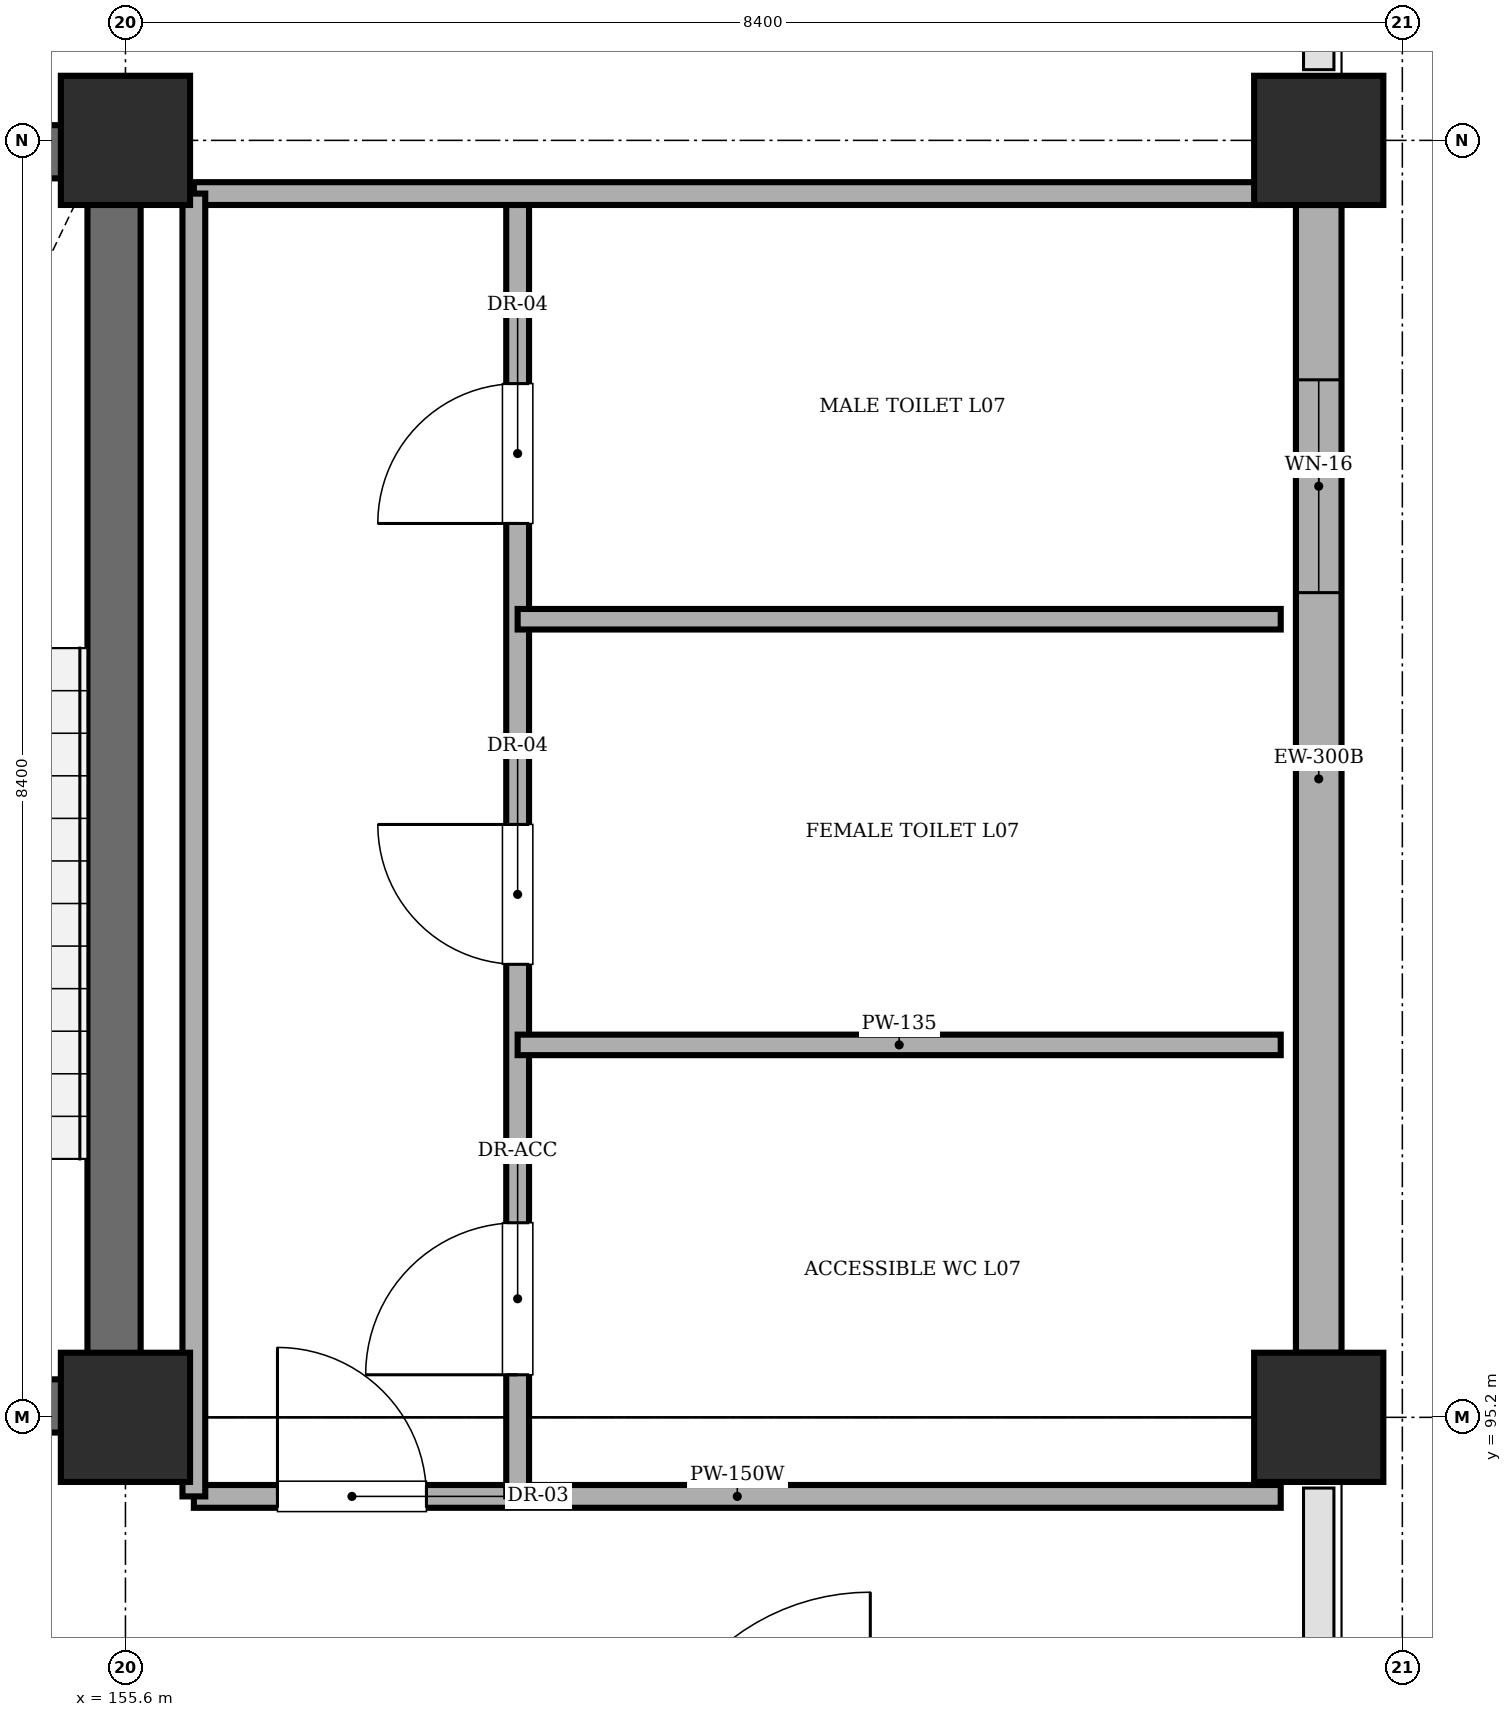
"""IFC4 building model, lengths in metres.
Left out: names, types, materials, properties, quantities, classifications, styles, units other than length and angle.
Written with IfcOpenShell. Run it as: python <this file> out.ifc"""

import sys

from ifc_helpers import new_model, si_unit, direction, frame, frame_2d, origin, origin_2d, place, context, subcontext, project, spatial, rectangle, extrude, element, fill, save


model = new_model("IFC4")
c1 = context("Model", 3, precision=1e-05, world=origin(), true_north=direction((0.0, 1.0)))
c2 = subcontext(c1, "Body", "Model", "MODEL_VIEW")
j1 = project(units=[si_unit("LENGTHUNIT", "METRE"), si_unit("PLANEANGLEUNIT", "RADIAN")], contexts=[c1])
p1 = place(None, origin())
s1 = spatial("IfcSite", under=j1, at=p1, CompositionType="ELEMENT")
p2 = place(p1, origin())
s2 = spatial("IfcBuilding", under=s1, at=p2, CompositionType="ELEMENT")
p3 = place(p2, frame((0.0, 0.0, 27.6)))
s3 = spatial("IfcBuildingStorey", under=s2, at=p3, CompositionType="ELEMENT", Elevation=27.6)
for number, where, z_axis, x_axis in (
    (1, (155.6, 95.2, 0.0), (0.0, 0.0, 1.0), (1.0, 0.0, 0.0)),
    (2, (155.6, 103.6, 0.0), (0.0, 0.0, 1.0), (1.0, 0.0, 0.0)),
    (3, (163.45, 95.2, 0.0), (0.0, 0.0, 1.0), (1.0, 0.0, 0.0)),
    (4, (163.45, 103.6, 0.0), (0.0, 0.0, 1.0), (1.0, 0.0, 0.0)),
):
    element("IfcColumn", number, at=place(p3, frame(where, z_axis=z_axis, x_axis=x_axis)), inside=s3, PredefinedType="COLUMN", context=c2, shape_type="SweptSolid", body=[
        extrude(rectangle(XDim=0.85, YDim=0.85, at=origin_2d()), origin(), (0.0, 0.0, 1.0), 4.02),
    ])
for number, where, z_axis, x_axis in (
    (5, (151.9, 95.275, 0.0), (0.0, 0.0, 1.0), (1.0, 0.0, 0.0)),
    (6, (151.9, 103.525, 0.0), (0.0, 0.0, 1.0), (1.0, 0.0, 0.0)),
):
    element("IfcWall", number, at=place(p3, frame(where, z_axis=z_axis, x_axis=x_axis)), inside=s3, PredefinedType="SHEAR", context=c2, shape_type="SweptSolid", body=[
        extrude(rectangle(XDim=3.8, YDim=0.35, at=frame_2d((1.9, 0.0))), origin(), (0.0, 0.0, 1.0), 4.02),
    ])
p4 = place(p3, frame((155.525, 95.45, 0.0), z_axis=(0.0, 0.0, 1.0), x_axis=(0.0, 1.0, 0.0)))
e7 = element("IfcWall", 7, at=p4, inside=s3, PredefinedType="SHEAR", context=c2, shape_type="SweptSolid", body=[
    extrude(rectangle(XDim=7.9, YDim=0.35, at=frame_2d((3.95, 0.0))), origin(), (0.0, 0.0, 1.0), 4.02),
])
p5 = place(p3, frame((163.45, 103.175, 0.0), z_axis=(0.0, 0.0, 1.0), x_axis=(0.0, -1.0, 0.0)))
e8 = element("IfcWall", 8, at=p5, inside=s3, PredefinedType="STANDARD", context=c2, shape_type="SweptSolid", body=[
    extrude(rectangle(XDim=7.55, YDim=0.3, at=frame_2d((3.775, 0.0))), origin(), (0.0, 0.0, 1.0), 3.32),
])
p6 = place(p5, frame((1.15, 0.0, 1.1)))
e9 = element("IfcOpeningElement", 9, at=p6, cuts=e8, PredefinedType="OPENING", context=c2, shape_type="SweptSolid", body=[
    extrude(rectangle(XDim=1.4, YDim=1.4, at=frame_2d((0.7, 0.7))), frame((0.0, 0.16, 0.0), z_axis=(0.0, -1.0, 0.0), x_axis=(1.0, 0.0, 0.0)), (0.0, 0.0, 1.0), 0.32),
])
p7 = place(p3, frame((156.05, 94.68, 0.0), z_axis=(0.0, 0.0, 1.0), x_axis=(1.0, 0.0, 0.0)))
e10 = element("IfcWall", 10, at=p7, inside=s3, PredefinedType="PARTITIONING", context=c2, shape_type="SweptSolid", body=[
    extrude(rectangle(XDim=7.15, YDim=0.15, at=frame_2d((3.575, 0.0))), origin(), (0.0, 0.0, 1.0), 4.02),
])
p8 = place(p7, frame((0.55, 0.0, 0.0)))
e11 = element("IfcOpeningElement", 11, at=p8, cuts=e10, PredefinedType="OPENING", context=c2, shape_type="SweptSolid", body=[
    extrude(rectangle(XDim=0.98, YDim=2.12, at=frame_2d((0.49, 1.06))), frame((0.0, 0.085, 0.0), z_axis=(0.0, -1.0, 0.0), x_axis=(1.0, 0.0, 0.0)), (0.0, 0.0, 1.0), 0.17),
])
p9 = place(p3, frame((158.18, 94.68, 0.0), z_axis=(0.0, 0.0, 1.0), x_axis=(0.0, 1.0, 0.0)))
e12 = element("IfcWall", 12, at=p9, inside=s3, PredefinedType="PARTITIONING", context=c2, shape_type="SweptSolid", body=[
    extrude(rectangle(XDim=8.57, YDim=0.15, at=frame_2d((4.285, 0.0))), origin(), (0.0, 0.0, 1.0), 4.02),
])
p10 = place(p9, frame((0.8, 0.0, 0.0)))
e13 = element("IfcOpeningElement", 13, at=p10, cuts=e12, PredefinedType="OPENING", context=c2, shape_type="SweptSolid", body=[
    extrude(rectangle(XDim=1.0, YDim=2.12, at=frame_2d((0.5, 1.06))), frame((0.0, 0.085, 0.0), z_axis=(0.0, -1.0, 0.0), x_axis=(1.0, 0.0, 0.0)), (0.0, 0.0, 1.0), 0.17),
])
p11 = place(p9, frame((3.5, 0.0, 0.0)))
e14 = element("IfcOpeningElement", 14, at=p11, cuts=e12, PredefinedType="OPENING", context=c2, shape_type="SweptSolid", body=[
    extrude(rectangle(XDim=0.92, YDim=2.1, at=frame_2d((0.46, 1.05))), frame((0.0, 0.085, 0.0), z_axis=(0.0, -1.0, 0.0), x_axis=(1.0, 0.0, 0.0)), (0.0, 0.0, 1.0), 0.17),
])
p12 = place(p9, frame((6.4, 0.0, 0.0)))
e15 = element("IfcOpeningElement", 15, at=p12, cuts=e12, PredefinedType="OPENING", context=c2, shape_type="SweptSolid", body=[
    extrude(rectangle(XDim=0.92, YDim=2.1, at=frame_2d((0.46, 1.05))), frame((0.0, 0.085, 0.0), z_axis=(0.0, -1.0, 0.0), x_axis=(1.0, 0.0, 0.0)), (0.0, 0.0, 1.0), 0.17),
])
for number, where, z_axis, x_axis in (
    (16, (158.18, 97.65, 0.0), (0.0, 0.0, 1.0), (1.0, 0.0, 0.0)),
    (17, (158.18, 100.45, 0.0), (0.0, 0.0, 1.0), (1.0, 0.0, 0.0)),
):
    element("IfcWall", number, at=place(p3, frame(where, z_axis=z_axis, x_axis=x_axis)), inside=s3, PredefinedType="PARTITIONING", context=c2, shape_type="SweptSolid", body=[
        extrude(rectangle(XDim=5.02, YDim=0.135, at=frame_2d((2.51, 0.0))), origin(), (0.0, 0.0, 1.0), 4.02),
    ])
p13 = place(p3, frame((156.05, 103.25, 0.0), z_axis=(0.0, 0.0, 1.0), x_axis=(1.0, 0.0, 0.0)))
e18 = element("IfcWall", 18, at=p13, inside=s3, PredefinedType="PARTITIONING", context=c2, shape_type="SweptSolid", body=[
    extrude(rectangle(XDim=7.15, YDim=0.15, at=frame_2d((3.575, 0.0))), origin(), (0.0, 0.0, 1.0), 4.02),
])
p14 = place(p3, frame((156.05, 94.68, 0.0), z_axis=(0.0, 0.0, 1.0), x_axis=(0.0, 1.0, 0.0)))
e19 = element("IfcWall", 19, at=p14, inside=s3, PredefinedType="PARTITIONING", context=c2, shape_type="SweptSolid", body=[
    extrude(rectangle(XDim=8.57, YDim=0.15, at=frame_2d((4.285, 0.0))), origin(), (0.0, 0.0, 1.0), 4.02),
])
p15 = place(p6, origin())
e20 = element("IfcWindow", 20, at=p15, inside=s3, PartitioningType="SINGLE_PANEL", PredefinedType="WINDOW", context=c2, shape_type="SweptSolid", body=[
    extrude(rectangle(XDim=1.4, YDim=1.4, at=frame_2d((0.7, 0.7))), frame((0.0, 0.03, 0.0), z_axis=(0.0, -1.0, 0.0), x_axis=(1.0, 0.0, 0.0)), (0.0, 0.0, 1.0), 0.06),
])
fill(e9, e20)
p16 = place(p8, origin())
e21 = element("IfcDoor", 21, at=p16, inside=s3, OperationType="SINGLE_SWING_LEFT", PredefinedType="DOOR", context=c2, shape_type="SweptSolid", body=[
    extrude(rectangle(XDim=0.98, YDim=2.12, at=frame_2d((0.49, 1.06))), frame((0.0, 0.025, 0.0), z_axis=(0.0, -1.0, 0.0), x_axis=(1.0, 0.0, 0.0)), (0.0, 0.0, 1.0), 0.05),
])
fill(e11, e21)
p17 = place(p10, origin())
e22 = element("IfcDoor", 22, at=p17, inside=s3, OperationType="SINGLE_SWING_LEFT", PredefinedType="DOOR", context=c2, shape_type="SweptSolid", body=[
    extrude(rectangle(XDim=1.0, YDim=2.12, at=frame_2d((0.5, 1.06))), frame((0.0, 0.025, 0.0), z_axis=(0.0, -1.0, 0.0), x_axis=(1.0, 0.0, 0.0)), (0.0, 0.0, 1.0), 0.05),
])
fill(e13, e22)
p18 = place(p11, origin())
e23 = element("IfcDoor", 23, at=p18, inside=s3, OperationType="SINGLE_SWING_RIGHT", PredefinedType="DOOR", context=c2, shape_type="SweptSolid", body=[
    extrude(rectangle(XDim=0.92, YDim=2.1, at=frame_2d((0.46, 1.05))), frame((0.0, 0.025, 0.0), z_axis=(0.0, -1.0, 0.0), x_axis=(1.0, 0.0, 0.0)), (0.0, 0.0, 1.0), 0.05),
])
fill(e14, e23)
p19 = place(p12, origin())
e24 = element("IfcDoor", 24, at=p19, inside=s3, OperationType="SINGLE_SWING_LEFT", PredefinedType="DOOR", context=c2, shape_type="SweptSolid", body=[
    extrude(rectangle(XDim=0.92, YDim=2.1, at=frame_2d((0.46, 1.05))), frame((0.0, 0.025, 0.0), z_axis=(0.0, -1.0, 0.0), x_axis=(1.0, 0.0, 0.0)), (0.0, 0.0, 1.0), 0.05),
])
fill(e15, e24)
save(model, sys.argv[1])
